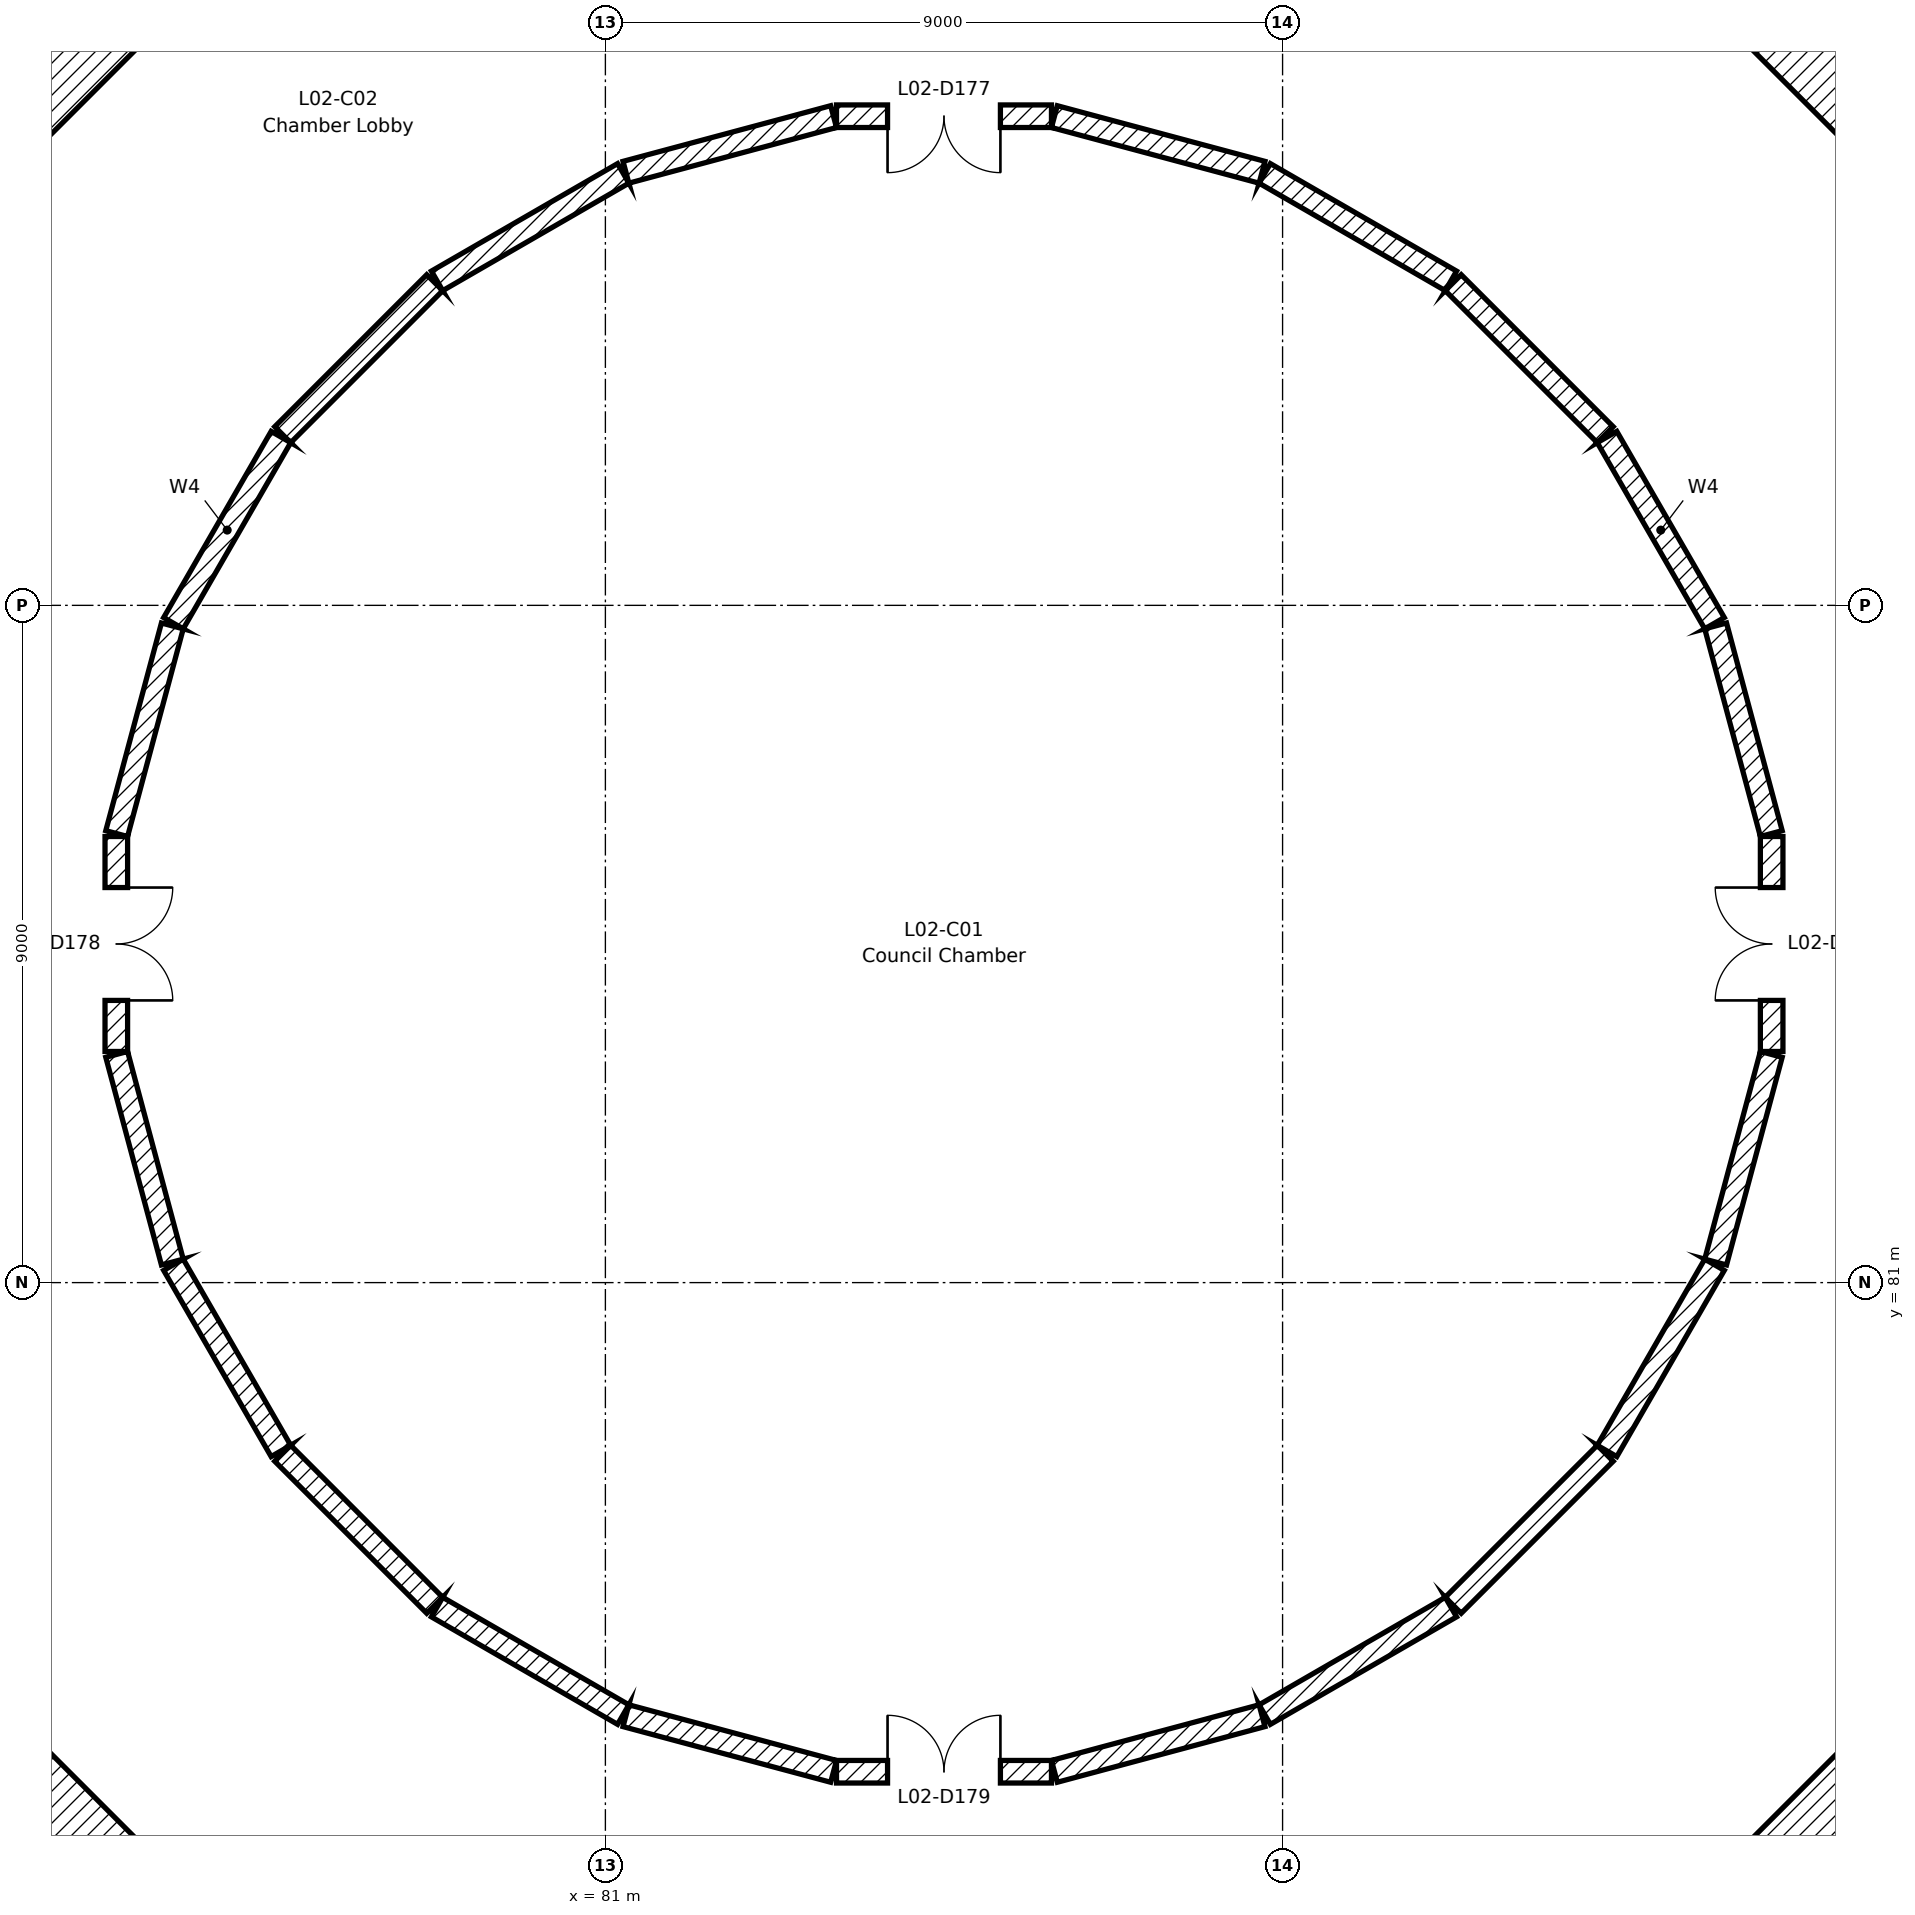
"""IFC4 building model, lengths in metres.
Left out: names, types, materials, properties, quantities, classifications, styles, units other than length and angle.
Written with IfcOpenShell. Run it as: python <this file> out.ifc"""

import sys

from ifc_helpers import new_model, si_unit, direction, frame, frame_2d, origin, place, context, subcontext, project, spatial, rectangle, extrude, element, fill, save


model = new_model("IFC4")
c1 = context("Model", 3, precision=1e-05, world=origin(), true_north=direction((0.0, 1.0)))
c2 = subcontext(c1, "Body", "Model", "MODEL_VIEW")
j1 = project(units=[si_unit("LENGTHUNIT", "METRE"), si_unit("PLANEANGLEUNIT", "RADIAN")], contexts=[c1])
p1 = place(None, origin())
s1 = spatial("IfcSite", under=j1, at=p1, CompositionType="ELEMENT")
p2 = place(p1, origin())
s2 = spatial("IfcBuilding", under=s1, at=p2, CompositionType="ELEMENT")
p3 = place(p2, frame((0.0, 0.0, 9.9)))
s3 = spatial("IfcBuildingStorey", under=s2, at=p3, CompositionType="ELEMENT", Elevation=9.9)
for number, where, z_axis, x_axis in (
    (1, (98.657, 95.678, 0.0), (0.0, 0.0, 1.0), (-0.707, 0.707, 0.0)),
    (2, (75.322, 98.657, 0.0), (0.0, 0.0, 1.0), (-0.707, -0.707, 0.0)),
    (3, (72.343, 75.322, 0.0), (0.0, 0.0, 1.0), (0.707, -0.707, 0.0)),
    (4, (95.678, 72.343, 0.0), (0.0, 0.0, 1.0), (0.707, 0.707, 0.0)),
):
    element("IfcWall", number, at=place(p3, frame(where, z_axis=z_axis, x_axis=x_axis)), inside=s3, PredefinedType="SHEAR", context=c2, shape_type="SweptSolid", body=[
        extrude(rectangle(XDim=4.213, YDim=1.0, at=frame_2d((2.106, 0.0))), origin(), (0.0, 0.0, 1.0), 4.3),
    ])
for number, where, z_axis, x_axis in (
    (5, (96.495, 86.967, 0.0), (0.0, 0.0, 1.0), (-0.259, 0.966, 0.0)),
    (6, (95.74, 89.763, 0.0), (0.0, 0.0, 1.0), (-0.5, 0.866, 0.0)),
):
    element("IfcWall", number, at=place(p3, frame(where, z_axis=z_axis, x_axis=x_axis)), inside=s3, PredefinedType="SHEAR", context=c2, shape_type="SweptSolid", body=[
        extrude(rectangle(XDim=2.857, YDim=0.3, at=frame_2d((1.428, 0.0))), origin(), (0.0, 0.0, 1.0), 4.3),
    ])
p4 = place(p3, frame((94.288, 92.268, 0.0), z_axis=(0.0, 0.0, 1.0), x_axis=(-0.707106781187, 0.707106781187, 0.0)))
e7 = element("IfcWall", 7, at=p4, inside=s3, PredefinedType="SHEAR", context=c2, shape_type="SweptSolid", body=[
    extrude(rectangle(XDim=2.857, YDim=0.3, at=frame_2d((1.428, 0.0))), origin(), (0.0, 0.0, 1.0), 4.3),
])
for number, where, z_axis, x_axis in (
    (8, (92.237, 94.312, 0.0), (0.0, 0.0, 1.0), (-0.866, 0.5, 0.0)),
    (9, (89.727, 95.756, 0.0), (0.0, 0.0, 1.0), (-0.966, 0.259, 0.0)),
):
    element("IfcWall", number, at=place(p3, frame(where, z_axis=z_axis, x_axis=x_axis)), inside=s3, PredefinedType="SHEAR", context=c2, shape_type="SweptSolid", body=[
        extrude(rectangle(XDim=2.857, YDim=0.3, at=frame_2d((1.428, 0.0))), origin(), (0.0, 0.0, 1.0), 4.3),
    ])
p5 = place(p3, frame((86.928, 96.5, 0.0), z_axis=(0.0, 0.0, 1.0), x_axis=(-1.0, 0.0, 0.0)))
e10 = element("IfcWall", 10, at=p5, inside=s3, PredefinedType="SHEAR", context=c2, shape_type="SweptSolid", body=[
    extrude(rectangle(XDim=2.857, YDim=0.3, at=frame_2d((1.428, 0.0))), origin(), (0.0, 0.0, 1.0), 4.3),
])
p6 = place(p5, frame((0.678, 0.0, 0.0)))
e11 = element("IfcOpeningElement", 11, at=p6, cuts=e10, PredefinedType="OPENING", context=c2, shape_type="SweptSolid", body=[
    extrude(rectangle(XDim=1.5, YDim=2.4, at=frame_2d((0.75, 1.2))), frame((0.0, 0.16, 0.0), z_axis=(0.0, -1.0, 0.0), x_axis=(1.0, 0.0, 0.0)), (0.0, 0.0, 1.0), 0.32),
])
for number, where, z_axis, x_axis in (
    (12, (84.033, 96.495, 0.0), (0.0, 0.0, 1.0), (-0.966, -0.259, 0.0)),
    (13, (81.237, 95.74, 0.0), (0.0, 0.0, 1.0), (-0.866, -0.5, 0.0)),
):
    element("IfcWall", number, at=place(p3, frame(where, z_axis=z_axis, x_axis=x_axis)), inside=s3, PredefinedType="SHEAR", context=c2, shape_type="SweptSolid", body=[
        extrude(rectangle(XDim=2.857, YDim=0.3, at=frame_2d((1.428, 0.0))), origin(), (0.0, 0.0, 1.0), 4.3),
    ])
p7 = place(p3, frame((78.732, 94.288, 0.0), z_axis=(0.0, 0.0, 1.0), x_axis=(-0.707106781187, -0.707106781187, 0.0)))
e14 = element("IfcWall", 14, at=p7, inside=s3, PredefinedType="SHEAR", context=c2, shape_type="SweptSolid", body=[
    extrude(rectangle(XDim=2.857, YDim=0.3, at=frame_2d((1.428, 0.0))), origin(), (0.0, 0.0, 1.0), 4.3),
])
for number, where, z_axis, x_axis in (
    (15, (76.688, 92.237, 0.0), (0.0, 0.0, 1.0), (-0.5, -0.866, 0.0)),
    (16, (75.244, 89.727, 0.0), (0.0, 0.0, 1.0), (-0.259, -0.966, 0.0)),
):
    element("IfcWall", number, at=place(p3, frame(where, z_axis=z_axis, x_axis=x_axis)), inside=s3, PredefinedType="SHEAR", context=c2, shape_type="SweptSolid", body=[
        extrude(rectangle(XDim=2.857, YDim=0.3, at=frame_2d((1.428, 0.0))), origin(), (0.0, 0.0, 1.0), 4.3),
    ])
p8 = place(p3, frame((74.5, 86.928, 0.0), z_axis=(0.0, 0.0, 1.0), x_axis=(0.0, -1.0, 0.0)))
e17 = element("IfcWall", 17, at=p8, inside=s3, PredefinedType="SHEAR", context=c2, shape_type="SweptSolid", body=[
    extrude(rectangle(XDim=2.857, YDim=0.3, at=frame_2d((1.428, 0.0))), origin(), (0.0, 0.0, 1.0), 4.3),
])
p9 = place(p8, frame((0.678, 0.0, 0.0)))
e18 = element("IfcOpeningElement", 18, at=p9, cuts=e17, PredefinedType="OPENING", context=c2, shape_type="SweptSolid", body=[
    extrude(rectangle(XDim=1.5, YDim=2.4, at=frame_2d((0.75, 1.2))), frame((0.0, 0.16, 0.0), z_axis=(0.0, -1.0, 0.0), x_axis=(1.0, 0.0, 0.0)), (0.0, 0.0, 1.0), 0.32),
])
for number, where, z_axis, x_axis in (
    (19, (74.505, 84.033, 0.0), (0.0, 0.0, 1.0), (0.259, -0.966, 0.0)),
    (20, (75.26, 81.237, 0.0), (0.0, 0.0, 1.0), (0.5, -0.866, 0.0)),
):
    element("IfcWall", number, at=place(p3, frame(where, z_axis=z_axis, x_axis=x_axis)), inside=s3, PredefinedType="SHEAR", context=c2, shape_type="SweptSolid", body=[
        extrude(rectangle(XDim=2.857, YDim=0.3, at=frame_2d((1.428, 0.0))), origin(), (0.0, 0.0, 1.0), 4.3),
    ])
p10 = place(p3, frame((76.712, 78.732, 0.0), z_axis=(0.0, 0.0, 1.0), x_axis=(0.707106781187, -0.707106781187, 0.0)))
e21 = element("IfcWall", 21, at=p10, inside=s3, PredefinedType="SHEAR", context=c2, shape_type="SweptSolid", body=[
    extrude(rectangle(XDim=2.857, YDim=0.3, at=frame_2d((1.428, 0.0))), origin(), (0.0, 0.0, 1.0), 4.3),
])
for number, where, z_axis, x_axis in (
    (22, (78.763, 76.688, 0.0), (0.0, 0.0, 1.0), (0.866, -0.5, 0.0)),
    (23, (81.273, 75.244, 0.0), (0.0, 0.0, 1.0), (0.966, -0.259, 0.0)),
):
    element("IfcWall", number, at=place(p3, frame(where, z_axis=z_axis, x_axis=x_axis)), inside=s3, PredefinedType="SHEAR", context=c2, shape_type="SweptSolid", body=[
        extrude(rectangle(XDim=2.857, YDim=0.3, at=frame_2d((1.428, 0.0))), origin(), (0.0, 0.0, 1.0), 4.3),
    ])
p11 = place(p3, frame((84.072, 74.5, 0.0), z_axis=(0.0, 0.0, 1.0), x_axis=(1.0, 0.0, 0.0)))
e24 = element("IfcWall", 24, at=p11, inside=s3, PredefinedType="SHEAR", context=c2, shape_type="SweptSolid", body=[
    extrude(rectangle(XDim=2.857, YDim=0.3, at=frame_2d((1.428, 0.0))), origin(), (0.0, 0.0, 1.0), 4.3),
])
p12 = place(p11, frame((0.678, 0.0, 0.0)))
e25 = element("IfcOpeningElement", 25, at=p12, cuts=e24, PredefinedType="OPENING", context=c2, shape_type="SweptSolid", body=[
    extrude(rectangle(XDim=1.5, YDim=2.4, at=frame_2d((0.75, 1.2))), frame((0.0, 0.16, 0.0), z_axis=(0.0, -1.0, 0.0), x_axis=(1.0, 0.0, 0.0)), (0.0, 0.0, 1.0), 0.32),
])
for number, where, z_axis, x_axis in (
    (26, (86.967, 74.505, 0.0), (0.0, 0.0, 1.0), (0.966, 0.259, 0.0)),
    (27, (89.763, 75.26, 0.0), (0.0, 0.0, 1.0), (0.866, 0.5, 0.0)),
):
    element("IfcWall", number, at=place(p3, frame(where, z_axis=z_axis, x_axis=x_axis)), inside=s3, PredefinedType="SHEAR", context=c2, shape_type="SweptSolid", body=[
        extrude(rectangle(XDim=2.857, YDim=0.3, at=frame_2d((1.428, 0.0))), origin(), (0.0, 0.0, 1.0), 4.3),
    ])
p13 = place(p3, frame((92.268, 76.712, 0.0), z_axis=(0.0, 0.0, 1.0), x_axis=(0.707106781187, 0.707106781187, 0.0)))
e28 = element("IfcWall", 28, at=p13, inside=s3, PredefinedType="SHEAR", context=c2, shape_type="SweptSolid", body=[
    extrude(rectangle(XDim=2.857, YDim=0.3, at=frame_2d((1.428, 0.0))), origin(), (0.0, 0.0, 1.0), 4.3),
])
for number, where, z_axis, x_axis in (
    (29, (94.312, 78.763, 0.0), (0.0, 0.0, 1.0), (0.5, 0.866, 0.0)),
    (30, (95.756, 81.273, 0.0), (0.0, 0.0, 1.0), (0.259, 0.966, 0.0)),
):
    element("IfcWall", number, at=place(p3, frame(where, z_axis=z_axis, x_axis=x_axis)), inside=s3, PredefinedType="SHEAR", context=c2, shape_type="SweptSolid", body=[
        extrude(rectangle(XDim=2.857, YDim=0.3, at=frame_2d((1.428, 0.0))), origin(), (0.0, 0.0, 1.0), 4.3),
    ])
p14 = place(p3, frame((96.5, 84.072, 0.0), z_axis=(0.0, 0.0, 1.0), x_axis=(0.0, 1.0, 0.0)))
e31 = element("IfcWall", 31, at=p14, inside=s3, PredefinedType="SHEAR", context=c2, shape_type="SweptSolid", body=[
    extrude(rectangle(XDim=2.857, YDim=0.3, at=frame_2d((1.428, 0.0))), origin(), (0.0, 0.0, 1.0), 4.3),
])
p15 = place(p14, frame((0.678, 0.0, 0.0)))
e32 = element("IfcOpeningElement", 32, at=p15, cuts=e31, PredefinedType="OPENING", context=c2, shape_type="SweptSolid", body=[
    extrude(rectangle(XDim=1.5, YDim=2.4, at=frame_2d((0.75, 1.2))), frame((0.0, 0.16, 0.0), z_axis=(0.0, -1.0, 0.0), x_axis=(1.0, 0.0, 0.0)), (0.0, 0.0, 1.0), 0.32),
])
p16 = place(p6, origin())
e33 = element("IfcDoor", 33, at=p16, inside=s3, OperationType="DOUBLE_DOOR_SINGLE_SWING", PredefinedType="DOOR", context=c2, shape_type="SweptSolid", body=[
    extrude(rectangle(XDim=1.5, YDim=2.4, at=frame_2d((0.75, 1.2))), frame((0.0, 0.025, 0.0), z_axis=(0.0, -1.0, 0.0), x_axis=(1.0, 0.0, 0.0)), (0.0, 0.0, 1.0), 0.05),
])
fill(e11, e33)
p17 = place(p9, origin())
e34 = element("IfcDoor", 34, at=p17, inside=s3, OperationType="DOUBLE_DOOR_SINGLE_SWING", PredefinedType="DOOR", context=c2, shape_type="SweptSolid", body=[
    extrude(rectangle(XDim=1.5, YDim=2.4, at=frame_2d((0.75, 1.2))), frame((0.0, 0.025, 0.0), z_axis=(0.0, -1.0, 0.0), x_axis=(1.0, 0.0, 0.0)), (0.0, 0.0, 1.0), 0.05),
])
fill(e18, e34)
p18 = place(p12, origin())
e35 = element("IfcDoor", 35, at=p18, inside=s3, OperationType="DOUBLE_DOOR_SINGLE_SWING", PredefinedType="DOOR", context=c2, shape_type="SweptSolid", body=[
    extrude(rectangle(XDim=1.5, YDim=2.4, at=frame_2d((0.75, 1.2))), frame((0.0, 0.025, 0.0), z_axis=(0.0, -1.0, 0.0), x_axis=(1.0, 0.0, 0.0)), (0.0, 0.0, 1.0), 0.05),
])
fill(e25, e35)
p19 = place(p15, origin())
e36 = element("IfcDoor", 36, at=p19, inside=s3, OperationType="DOUBLE_DOOR_SINGLE_SWING", PredefinedType="DOOR", context=c2, shape_type="SweptSolid", body=[
    extrude(rectangle(XDim=1.5, YDim=2.4, at=frame_2d((0.75, 1.2))), frame((0.0, 0.025, 0.0), z_axis=(0.0, -1.0, 0.0), x_axis=(1.0, 0.0, 0.0)), (0.0, 0.0, 1.0), 0.05),
])
fill(e32, e36)
save(model, sys.argv[1])
